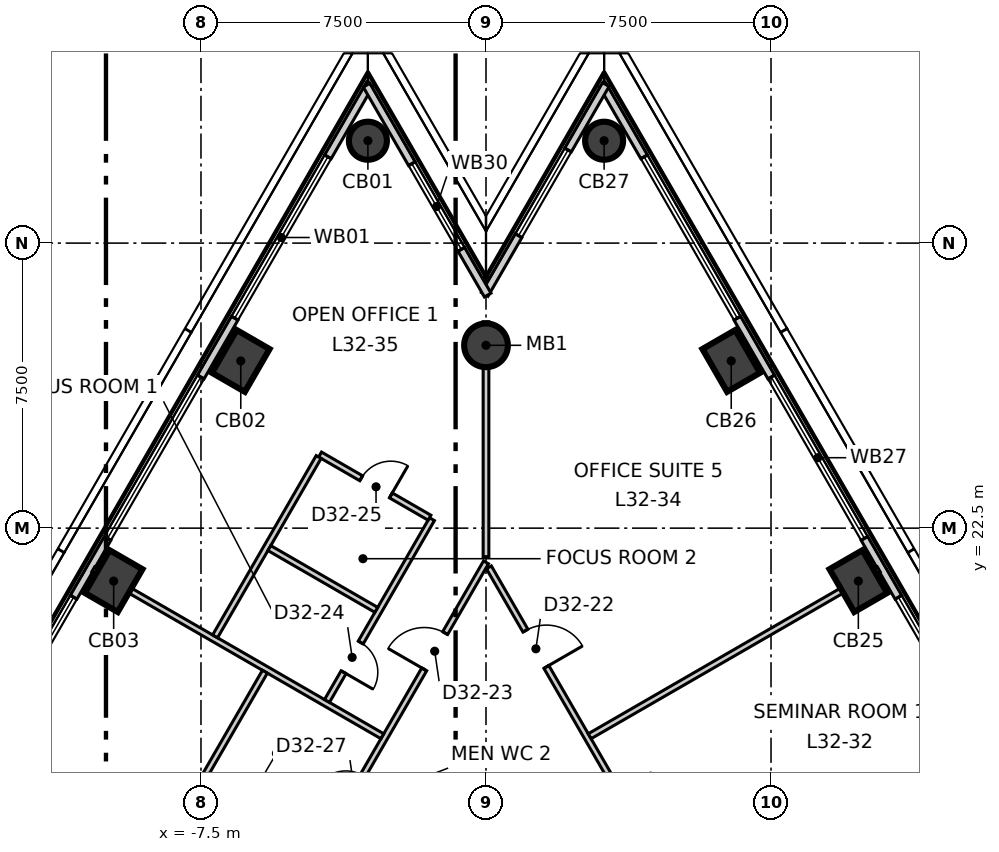
"""IFC4 building model, lengths in metres.
Left out: names, types, materials, properties, quantities, classifications, styles, units other than length and angle.
Written with IfcOpenShell. Run it as: python <this file> out.ifc"""

import sys

from ifc_helpers import new_model, si_unit, direction, frame, frame_2d, origin, origin_2d, place, context, subcontext, project, spatial, rectangle, circle, extrude, element, fill, save


model = new_model("IFC4")
c1 = context("Model", 3, precision=1e-05, world=origin(), true_north=direction((0.0, 1.0)))
c2 = subcontext(c1, "Body", "Model", "MODEL_VIEW")
j1 = project(units=[si_unit("LENGTHUNIT", "METRE"), si_unit("PLANEANGLEUNIT", "RADIAN")], contexts=[c1])
p1 = place(None, origin())
s1 = spatial("IfcSite", under=j1, at=p1, CompositionType="ELEMENT")
p2 = place(p1, origin())
s2 = spatial("IfcBuilding", under=s1, at=p2, CompositionType="ELEMENT")
p3 = place(p2, frame((0.0, 0.0, 140.3)))
s3 = spatial("IfcBuildingStorey", under=s2, at=p3, CompositionType="ELEMENT", Elevation=140.3)
p4 = place(p3, frame((-3.108, 32.694, -0.3), z_axis=(0.0, 0.0, 1.0), x_axis=(0.5, 0.866025403784, 0.0)))
e1 = element("IfcColumn", 1, at=p4, inside=s3, PredefinedType="COLUMN", context=c2, shape_type="SweptSolid", body=[
    extrude(circle(Radius=0.5, at=origin_2d()), origin(), (0.0, 0.0, 1.0), 4.0),
])
for number, where, z_axis, x_axis in (
    (2, (-6.453, 26.9, -0.3), (0.0, 0.0, 1.0), (0.5, 0.866, 0.0)),
    (3, (-9.798, 21.107, -0.3), (0.0, 0.0, 1.0), (0.5, 0.866, 0.0)),
    (4, (9.798, 21.107, -0.3), (0.0, 0.0, 1.0), (-0.5, 0.866, 0.0)),
    (5, (6.453, 26.9, -0.3), (0.0, 0.0, 1.0), (-0.5, 0.866, 0.0)),
):
    element("IfcColumn", number, at=place(p3, frame(where, z_axis=z_axis, x_axis=x_axis)), inside=s3, PredefinedType="COLUMN", context=c2, shape_type="SweptSolid", body=[
        extrude(rectangle(XDim=1.3, YDim=1.0, at=origin_2d()), origin(), (0.0, 0.0, 1.0), 4.0),
    ])
p5 = place(p3, frame((3.108, 32.694, -0.3), z_axis=(0.0, 0.0, 1.0), x_axis=(-0.5, 0.866025403784, 0.0)))
e6 = element("IfcColumn", 6, at=p5, inside=s3, PredefinedType="COLUMN", context=c2, shape_type="SweptSolid", body=[
    extrude(circle(Radius=0.5, at=origin_2d()), origin(), (0.0, 0.0, 1.0), 4.0),
])
p6 = place(p3, frame((0.0, 27.311, -0.3), z_axis=(0.0, 0.0, 1.0), x_axis=(1.0, 0.0, 0.0)))
e7 = element("IfcColumn", 7, at=p6, inside=s3, PredefinedType="COLUMN", context=c2, shape_type="SweptSolid", body=[
    extrude(circle(Radius=0.575, at=origin_2d()), origin(), (0.0, 0.0, 1.0), 4.0),
])
p7 = place(p3, frame((-3.063, 34.172, 0.0), z_axis=(0.0, 0.0, 1.0), x_axis=(-0.500008098571, -0.866020728022, 0.0)))
e8 = element("IfcWall", 8, at=p7, inside=s3, PredefinedType="ELEMENTEDWALL", context=c2, shape_type="SweptSolid", body=[
    extrude(rectangle(XDim=56.105, YDim=0.2, at=frame_2d((28.052, 0.0))), origin(), (0.0, 0.0, 1.0), 3.7),
])
p8 = place(p7, frame((2.197, 0.0, 0.9)))
e9 = element("IfcOpeningElement", 9, at=p8, cuts=e8, PredefinedType="OPENING", context=c2, shape_type="SweptSolid", body=[
    extrude(rectangle(XDim=4.9, YDim=2.5, at=frame_2d((2.45, 1.25))), frame((0.0, 0.11, 0.0), z_axis=(0.0, -1.0, 0.0), x_axis=(1.0, 0.0, 0.0)), (0.0, 0.0, 1.0), 0.22),
])
p9 = place(p7, frame((8.887, 0.0, 0.9)))
e10 = element("IfcOpeningElement", 10, at=p9, cuts=e8, PredefinedType="OPENING", context=c2, shape_type="SweptSolid", body=[
    extrude(rectangle(XDim=4.9, YDim=2.5, at=frame_2d((2.45, 1.25))), frame((0.0, 0.11, 0.0), z_axis=(0.0, -1.0, 0.0), x_axis=(1.0, 0.0, 0.0)), (0.0, 0.0, 1.0), 0.22),
])
p10 = place(p7, frame((15.577, 0.0, 0.9)))
e11 = element("IfcOpeningElement", 11, at=p10, cuts=e8, PredefinedType="OPENING", context=c2, shape_type="SweptSolid", body=[
    extrude(rectangle(XDim=4.9, YDim=2.5, at=frame_2d((2.45, 1.25))), frame((0.0, 0.11, 0.0), z_axis=(0.0, -1.0, 0.0), x_axis=(1.0, 0.0, 0.0)), (0.0, 0.0, 1.0), 0.22),
])
p11 = place(p7, frame((22.267, 0.0, 0.9)))
e12 = element("IfcOpeningElement", 12, at=p11, cuts=e8, PredefinedType="OPENING", context=c2, shape_type="SweptSolid", body=[
    extrude(rectangle(XDim=4.9, YDim=2.5, at=frame_2d((2.45, 1.25))), frame((0.0, 0.11, 0.0), z_axis=(0.0, -1.0, 0.0), x_axis=(1.0, 0.0, 0.0)), (0.0, 0.0, 1.0), 0.22),
])
p12 = place(p7, frame((28.957, 0.0, 0.9)))
e13 = element("IfcOpeningElement", 13, at=p12, cuts=e8, PredefinedType="OPENING", context=c2, shape_type="SweptSolid", body=[
    extrude(rectangle(XDim=4.9, YDim=2.5, at=frame_2d((2.45, 1.25))), frame((0.0, 0.11, 0.0), z_axis=(0.0, -1.0, 0.0), x_axis=(1.0, 0.0, 0.0)), (0.0, 0.0, 1.0), 0.22),
])
p13 = place(p7, frame((35.647, 0.0, 0.9)))
e14 = element("IfcOpeningElement", 14, at=p13, cuts=e8, PredefinedType="OPENING", context=c2, shape_type="SweptSolid", body=[
    extrude(rectangle(XDim=4.9, YDim=2.5, at=frame_2d((2.45, 1.25))), frame((0.0, 0.11, 0.0), z_axis=(0.0, -1.0, 0.0), x_axis=(1.0, 0.0, 0.0)), (0.0, 0.0, 1.0), 0.22),
])
p14 = place(p7, frame((42.337, 0.0, 0.9)))
e15 = element("IfcOpeningElement", 15, at=p14, cuts=e8, PredefinedType="OPENING", context=c2, shape_type="SweptSolid", body=[
    extrude(rectangle(XDim=4.9, YDim=2.5, at=frame_2d((2.45, 1.25))), frame((0.0, 0.11, 0.0), z_axis=(0.0, -1.0, 0.0), x_axis=(1.0, 0.0, 0.0)), (0.0, 0.0, 1.0), 0.22),
])
p15 = place(p7, frame((49.027, 0.0, 0.9)))
e16 = element("IfcOpeningElement", 16, at=p15, cuts=e8, PredefinedType="OPENING", context=c2, shape_type="SweptSolid", body=[
    extrude(rectangle(XDim=4.9, YDim=2.5, at=frame_2d((2.45, 1.25))), frame((0.0, 0.11, 0.0), z_axis=(0.0, -1.0, 0.0), x_axis=(1.0, 0.0, 0.0)), (0.0, 0.0, 1.0), 0.22),
])
p16 = place(p3, frame((31.126, -14.433, 0.0), z_axis=(0.0, 0.0, 1.0), x_axis=(-0.500008098571, 0.866020728022, 0.0)))
e17 = element("IfcWall", 17, at=p16, inside=s3, PredefinedType="ELEMENTEDWALL", context=c2, shape_type="SweptSolid", body=[
    extrude(rectangle(XDim=56.105, YDim=0.2, at=frame_2d((28.052, 0.0))), origin(), (0.0, 0.0, 1.0), 3.7),
])
p17 = place(p16, frame((2.198, 0.0, 0.9)))
e18 = element("IfcOpeningElement", 18, at=p17, cuts=e17, PredefinedType="OPENING", context=c2, shape_type="SweptSolid", body=[
    extrude(rectangle(XDim=4.9, YDim=2.5, at=frame_2d((2.45, 1.25))), frame((0.0, 0.11, 0.0), z_axis=(0.0, -1.0, 0.0), x_axis=(1.0, 0.0, 0.0)), (0.0, 0.0, 1.0), 0.22),
])
p18 = place(p16, frame((8.888, 0.0, 0.9)))
e19 = element("IfcOpeningElement", 19, at=p18, cuts=e17, PredefinedType="OPENING", context=c2, shape_type="SweptSolid", body=[
    extrude(rectangle(XDim=4.9, YDim=2.5, at=frame_2d((2.45, 1.25))), frame((0.0, 0.11, 0.0), z_axis=(0.0, -1.0, 0.0), x_axis=(1.0, 0.0, 0.0)), (0.0, 0.0, 1.0), 0.22),
])
p19 = place(p16, frame((15.578, 0.0, 0.9)))
e20 = element("IfcOpeningElement", 20, at=p19, cuts=e17, PredefinedType="OPENING", context=c2, shape_type="SweptSolid", body=[
    extrude(rectangle(XDim=4.9, YDim=2.5, at=frame_2d((2.45, 1.25))), frame((0.0, 0.11, 0.0), z_axis=(0.0, -1.0, 0.0), x_axis=(1.0, 0.0, 0.0)), (0.0, 0.0, 1.0), 0.22),
])
p20 = place(p16, frame((22.267, 0.0, 0.9)))
e21 = element("IfcOpeningElement", 21, at=p20, cuts=e17, PredefinedType="OPENING", context=c2, shape_type="SweptSolid", body=[
    extrude(rectangle(XDim=4.9, YDim=2.5, at=frame_2d((2.45, 1.25))), frame((0.0, 0.11, 0.0), z_axis=(0.0, -1.0, 0.0), x_axis=(1.0, 0.0, 0.0)), (0.0, 0.0, 1.0), 0.22),
])
p21 = place(p16, frame((28.957, 0.0, 0.9)))
e22 = element("IfcOpeningElement", 22, at=p21, cuts=e17, PredefinedType="OPENING", context=c2, shape_type="SweptSolid", body=[
    extrude(rectangle(XDim=4.9, YDim=2.5, at=frame_2d((2.45, 1.25))), frame((0.0, 0.11, 0.0), z_axis=(0.0, -1.0, 0.0), x_axis=(1.0, 0.0, 0.0)), (0.0, 0.0, 1.0), 0.22),
])
p22 = place(p16, frame((35.647, 0.0, 0.9)))
e23 = element("IfcOpeningElement", 23, at=p22, cuts=e17, PredefinedType="OPENING", context=c2, shape_type="SweptSolid", body=[
    extrude(rectangle(XDim=4.9, YDim=2.5, at=frame_2d((2.45, 1.25))), frame((0.0, 0.11, 0.0), z_axis=(0.0, -1.0, 0.0), x_axis=(1.0, 0.0, 0.0)), (0.0, 0.0, 1.0), 0.22),
])
p23 = place(p16, frame((42.337, 0.0, 0.9)))
e24 = element("IfcOpeningElement", 24, at=p23, cuts=e17, PredefinedType="OPENING", context=c2, shape_type="SweptSolid", body=[
    extrude(rectangle(XDim=4.9, YDim=2.5, at=frame_2d((2.45, 1.25))), frame((0.0, 0.11, 0.0), z_axis=(0.0, -1.0, 0.0), x_axis=(1.0, 0.0, 0.0)), (0.0, 0.0, 1.0), 0.22),
])
p24 = place(p16, frame((49.027, 0.0, 0.9)))
e25 = element("IfcOpeningElement", 25, at=p24, cuts=e17, PredefinedType="OPENING", context=c2, shape_type="SweptSolid", body=[
    extrude(rectangle(XDim=4.9, YDim=2.5, at=frame_2d((2.45, 1.25))), frame((0.0, 0.11, 0.0), z_axis=(0.0, -1.0, 0.0), x_axis=(1.0, 0.0, 0.0)), (0.0, 0.0, 1.0), 0.22),
])
p25 = place(p3, frame((3.153, 34.172, 0.0), z_axis=(0.0, 0.0, 1.0), x_axis=(-0.499968821344, -0.866043404042, 0.0)))
e26 = element("IfcWall", 26, at=p25, inside=s3, PredefinedType="ELEMENTEDWALL", context=c2, shape_type="SweptSolid", body=[
    extrude(rectangle(XDim=6.376, YDim=0.2, at=frame_2d((3.188, 0.0))), origin(), (0.0, 0.0, 1.0), 3.7),
])
p26 = place(p25, frame((1.99, 0.0, 0.9)))
e27 = element("IfcOpeningElement", 27, at=p26, cuts=e26, PredefinedType="OPENING", context=c2, shape_type="SweptSolid", body=[
    extrude(rectangle(XDim=2.6, YDim=2.5, at=frame_2d((1.3, 1.25))), frame((0.0, 0.11, 0.0), z_axis=(0.0, -1.0, 0.0), x_axis=(1.0, 0.0, 0.0)), (0.0, 0.0, 1.0), 0.22),
])
p27 = place(p3, frame((0.045, 28.633, 0.0), z_axis=(0.0, 0.0, 1.0), x_axis=(-0.49998540044, 0.866033832681, 0.0)))
e28 = element("IfcWall", 28, at=p27, inside=s3, PredefinedType="ELEMENTEDWALL", context=c2, shape_type="SweptSolid", body=[
    extrude(rectangle(XDim=6.376, YDim=0.2, at=frame_2d((3.188, 0.0))), origin(), (0.0, 0.0, 1.0), 3.7),
])
p28 = place(p27, frame((1.39, 0.0, 0.9)))
e29 = element("IfcOpeningElement", 29, at=p28, cuts=e28, PredefinedType="OPENING", context=c2, shape_type="SweptSolid", body=[
    extrude(rectangle(XDim=2.6, YDim=2.5, at=frame_2d((1.3, 1.25))), frame((0.0, 0.11, 0.0), z_axis=(0.0, -1.0, 0.0), x_axis=(1.0, 0.0, 0.0)), (0.0, 0.0, 1.0), 0.22),
])
p29 = place(p3, frame((-8.902, 6.181, 0.0), z_axis=(0.0, 0.0, 1.0), x_axis=(0.499992688384, 0.866029625107, 0.0)))
e30 = element("IfcWall", 30, at=p29, inside=s3, PredefinedType="PARTITIONING", context=c2, shape_type="SweptSolid", body=[
    extrude(rectangle(XDim=17.804, YDim=0.15, at=frame_2d((8.902, 0.0))), origin(), (0.0, 0.0, 1.0), 3.7),
])
p30 = place(p29, frame((14.554, 0.0, 0.0)))
e31 = element("IfcOpeningElement", 31, at=p30, cuts=e30, PredefinedType="OPENING", context=c2, shape_type="SweptSolid", body=[
    extrude(rectangle(XDim=1.1, YDim=2.1, at=frame_2d((0.55, 1.05))), frame((0.0, 0.085, 0.0), z_axis=(0.0, -1.0, 0.0), x_axis=(1.0, 0.0, 0.0)), (0.0, 0.0, 1.0), 0.17),
])
p31 = place(p29, frame((10.428, 0.0, 0.0)))
e32 = element("IfcOpeningElement", 32, at=p31, cuts=e30, PredefinedType="OPENING", context=c2, shape_type="SweptSolid", body=[
    extrude(rectangle(XDim=0.9, YDim=2.1, at=frame_2d((0.45, 1.05))), frame((0.0, 0.085, 0.0), z_axis=(0.0, -1.0, 0.0), x_axis=(1.0, 0.0, 0.0)), (0.0, 0.0, 1.0), 0.17),
])
p32 = place(p29, frame((7.228, 0.0, 0.0)))
e33 = element("IfcOpeningElement", 33, at=p32, cuts=e30, PredefinedType="OPENING", context=c2, shape_type="SweptSolid", body=[
    extrude(rectangle(XDim=0.9, YDim=2.1, at=frame_2d((0.45, 1.05))), frame((0.0, 0.085, 0.0), z_axis=(0.0, -1.0, 0.0), x_axis=(1.0, 0.0, 0.0)), (0.0, 0.0, 1.0), 0.17),
])
p33 = place(p29, frame((4.428, 0.0, 0.0)))
e34 = element("IfcOpeningElement", 34, at=p33, cuts=e30, PredefinedType="OPENING", context=c2, shape_type="SweptSolid", body=[
    extrude(rectangle(XDim=1.0, YDim=2.1, at=frame_2d((0.5, 1.05))), frame((0.0, 0.085, 0.0), z_axis=(0.0, -1.0, 0.0), x_axis=(1.0, 0.0, 0.0)), (0.0, 0.0, 1.0), 0.17),
])
p34 = place(p3, frame((-10.335, 21.417, 0.0), z_axis=(0.0, 0.0, 1.0), x_axis=(0.866014327354, -0.50001918445, 0.0)))
e35 = element("IfcWall", 35, at=p34, inside=s3, PredefinedType="PARTITIONING", context=c2, shape_type="SweptSolid", body=[
    extrude(rectangle(XDim=8.784, YDim=0.15, at=frame_2d((4.392, 0.0))), origin(), (0.0, 0.0, 1.0), 3.7),
])
p35 = place(p3, frame((-10.181, 11.167, 0.0), z_axis=(0.0, 0.0, 1.0), x_axis=(0.500033294772, 0.866006180185, 0.0)))
e36 = element("IfcWall", 36, at=p35, inside=s3, PredefinedType="PARTITIONING", context=c2, shape_type="SweptSolid", body=[
    extrude(rectangle(XDim=8.725, YDim=0.15, at=frame_2d((4.363, 0.0))), origin(), (0.0, 0.0, 1.0), 3.7),
])
p36 = place(p3, frame((0.0, 21.75, 0.0), z_axis=(0.0, 0.0, 1.0), x_axis=(0.0, 1.0, 0.0)))
e37 = element("IfcWall", 37, at=p36, inside=s3, PredefinedType="PARTITIONING", context=c2, shape_type="SweptSolid", body=[
    extrude(rectangle(XDim=6.181, YDim=0.15, at=frame_2d((3.09, 0.0))), origin(), (0.0, 0.0, 1.0), 3.15),
])
p37 = place(p3, frame((0.076, 21.468, 0.0), z_axis=(0.0, 0.0, 1.0), x_axis=(0.499999691263, -0.866025582034, 0.0)))
e38 = element("IfcWall", 38, at=p37, inside=s3, PredefinedType="PARTITIONING", context=c2, shape_type="SweptSolid", body=[
    extrude(rectangle(XDim=24.342, YDim=0.15, at=frame_2d((12.171, 0.0))), origin(), (0.0, 0.0, 1.0), 3.7),
])
p38 = place(p37, frame((17.594, 0.0, 0.0)))
e39 = element("IfcOpeningElement", 39, at=p38, cuts=e38, PredefinedType="OPENING", context=c2, shape_type="SweptSolid", body=[
    extrude(rectangle(XDim=1.1, YDim=2.1, at=frame_2d((0.55, 1.05))), frame((0.0, 0.085, 0.0), z_axis=(0.0, -1.0, 0.0), x_axis=(1.0, 0.0, 0.0)), (0.0, 0.0, 1.0), 0.17),
])
p39 = place(p37, frame((6.814, 0.0, 0.0)))
e40 = element("IfcOpeningElement", 40, at=p39, cuts=e38, PredefinedType="OPENING", context=c2, shape_type="SweptSolid", body=[
    extrude(rectangle(XDim=1.0, YDim=2.1, at=frame_2d((0.5, 1.05))), frame((0.0, 0.085, 0.0), z_axis=(0.0, -1.0, 0.0), x_axis=(1.0, 0.0, 0.0)), (0.0, 0.0, 1.0), 0.17),
])
p40 = place(p37, frame((10.214, 0.0, 0.0)))
e41 = element("IfcOpeningElement", 41, at=p40, cuts=e38, PredefinedType="OPENING", context=c2, shape_type="SweptSolid", body=[
    extrude(rectangle(XDim=0.9, YDim=2.1, at=frame_2d((0.45, 1.05))), frame((0.0, 0.085, 0.0), z_axis=(0.0, -1.0, 0.0), x_axis=(1.0, 0.0, 0.0)), (0.0, 0.0, 1.0), 0.17),
])
p41 = place(p37, frame((1.924, 0.0, 0.0)))
e42 = element("IfcOpeningElement", 42, at=p41, cuts=e38, PredefinedType="OPENING", context=c2, shape_type="SweptSolid", body=[
    extrude(rectangle(XDim=1.1, YDim=2.1, at=frame_2d((0.55, 1.05))), frame((0.0, 0.085, 0.0), z_axis=(0.0, -1.0, 0.0), x_axis=(1.0, 0.0, 0.0)), (0.0, 0.0, 1.0), 0.17),
])
p42 = place(p3, frame((2.728, 17.025, 0.0), z_axis=(0.0, 0.0, 1.0), x_axis=(0.866014327354, 0.50001918445, 0.0)))
e43 = element("IfcWall", 43, at=p42, inside=s3, PredefinedType="PARTITIONING", context=c2, shape_type="SweptSolid", body=[
    extrude(rectangle(XDim=8.784, YDim=0.15, at=frame_2d((4.392, 0.0))), origin(), (0.0, 0.0, 1.0), 3.7),
])
p43 = place(p3, frame((-4.184, 17.953, 0.0), z_axis=(0.0, 0.0, 1.0), x_axis=(0.499974945523, 0.866039868511, 0.0)))
e44 = element("IfcWall", 44, at=p43, inside=s3, PredefinedType="PARTITIONING", context=c2, shape_type="SweptSolid", body=[
    extrude(rectangle(XDim=5.524, YDim=0.15, at=frame_2d((2.762, 0.0))), origin(), (0.0, 0.0, 1.0), 3.7),
])
p44 = place(p43, frame((0.874, 0.0, 0.0)))
e45 = element("IfcOpeningElement", 45, at=p44, cuts=e44, PredefinedType="OPENING", context=c2, shape_type="SweptSolid", body=[
    extrude(rectangle(XDim=0.9, YDim=2.1, at=frame_2d((0.45, 1.05))), frame((0.0, 0.085, 0.0), z_axis=(0.0, -1.0, 0.0), x_axis=(1.0, 0.0, 0.0)), (0.0, 0.0, 1.0), 0.17),
])
p45 = place(p3, frame((-4.366, 24.437, 0.0), z_axis=(0.0, 0.0, 1.0), x_axis=(0.866029041019, -0.499993700073, 0.0)))
e46 = element("IfcWall", 46, at=p45, inside=s3, PredefinedType="PARTITIONING", context=c2, shape_type="SweptSolid", body=[
    extrude(rectangle(XDim=3.324, YDim=0.15, at=frame_2d((1.662, 0.0))), origin(), (0.0, 0.0, 1.0), 3.7),
])
p46 = place(p45, frame((1.25, 0.0, 0.0)))
e47 = element("IfcOpeningElement", 47, at=p46, cuts=e46, PredefinedType="OPENING", context=c2, shape_type="SweptSolid", body=[
    extrude(rectangle(XDim=0.9, YDim=2.1, at=frame_2d((0.45, 1.05))), frame((0.0, 0.085, 0.0), z_axis=(0.0, -1.0, 0.0), x_axis=(1.0, 0.0, 0.0)), (0.0, 0.0, 1.0), 0.17),
])
p47 = place(p3, frame((-7.129, 19.653, 0.0), z_axis=(0.0, 0.0, 1.0), x_axis=(0.500046929803, 0.865998307155, 0.0)))
e48 = element("IfcWall", 48, at=p47, inside=s3, PredefinedType="PARTITIONING", context=c2, shape_type="SweptSolid", body=[
    extrude(rectangle(XDim=5.449, YDim=0.15, at=frame_2d((2.725, 0.0))), origin(), (0.0, 0.0, 1.0), 3.7),
])
p48 = place(p3, frame((-5.701, 21.975, 0.0), z_axis=(0.0, 0.0, 1.0), x_axis=(0.865977875238, -0.500082312822, 0.0)))
e49 = element("IfcWall", 49, at=p48, inside=s3, PredefinedType="PARTITIONING", context=c2, shape_type="SweptSolid", body=[
    extrude(rectangle(XDim=3.25, YDim=0.15, at=frame_2d((1.625, 0.0))), origin(), (0.0, 0.0, 1.0), 3.7),
])
p49 = place(p8, origin())
e50 = element("IfcWindow", 50, at=p49, inside=s3, PartitioningType="SINGLE_PANEL", PredefinedType="WINDOW", context=c2, shape_type="SweptSolid", body=[
    extrude(rectangle(XDim=4.9, YDim=2.5, at=frame_2d((2.45, 1.25))), frame((0.0, 0.03, 0.0), z_axis=(0.0, -1.0, 0.0), x_axis=(1.0, 0.0, 0.0)), (0.0, 0.0, 1.0), 0.06),
])
fill(e9, e50)
p50 = place(p9, origin())
e51 = element("IfcWindow", 51, at=p50, inside=s3, PartitioningType="SINGLE_PANEL", PredefinedType="WINDOW", context=c2, shape_type="SweptSolid", body=[
    extrude(rectangle(XDim=4.9, YDim=2.5, at=frame_2d((2.45, 1.25))), frame((0.0, 0.03, 0.0), z_axis=(0.0, -1.0, 0.0), x_axis=(1.0, 0.0, 0.0)), (0.0, 0.0, 1.0), 0.06),
])
fill(e10, e51)
p51 = place(p10, origin())
e52 = element("IfcWindow", 52, at=p51, inside=s3, PartitioningType="SINGLE_PANEL", PredefinedType="WINDOW", context=c2, shape_type="SweptSolid", body=[
    extrude(rectangle(XDim=4.9, YDim=2.5, at=frame_2d((2.45, 1.25))), frame((0.0, 0.03, 0.0), z_axis=(0.0, -1.0, 0.0), x_axis=(1.0, 0.0, 0.0)), (0.0, 0.0, 1.0), 0.06),
])
fill(e11, e52)
p52 = place(p22, origin())
e53 = element("IfcWindow", 53, at=p52, inside=s3, PartitioningType="SINGLE_PANEL", PredefinedType="WINDOW", context=c2, shape_type="SweptSolid", body=[
    extrude(rectangle(XDim=4.9, YDim=2.5, at=frame_2d((2.45, 1.25))), frame((0.0, 0.03, 0.0), z_axis=(0.0, -1.0, 0.0), x_axis=(1.0, 0.0, 0.0)), (0.0, 0.0, 1.0), 0.06),
])
fill(e23, e53)
p53 = place(p23, origin())
e54 = element("IfcWindow", 54, at=p53, inside=s3, PartitioningType="SINGLE_PANEL", PredefinedType="WINDOW", context=c2, shape_type="SweptSolid", body=[
    extrude(rectangle(XDim=4.9, YDim=2.5, at=frame_2d((2.45, 1.25))), frame((0.0, 0.03, 0.0), z_axis=(0.0, -1.0, 0.0), x_axis=(1.0, 0.0, 0.0)), (0.0, 0.0, 1.0), 0.06),
])
fill(e24, e54)
p54 = place(p24, origin())
e55 = element("IfcWindow", 55, at=p54, inside=s3, PartitioningType="SINGLE_PANEL", PredefinedType="WINDOW", context=c2, shape_type="SweptSolid", body=[
    extrude(rectangle(XDim=4.9, YDim=2.5, at=frame_2d((2.45, 1.25))), frame((0.0, 0.03, 0.0), z_axis=(0.0, -1.0, 0.0), x_axis=(1.0, 0.0, 0.0)), (0.0, 0.0, 1.0), 0.06),
])
fill(e25, e55)
p55 = place(p26, origin())
e56 = element("IfcWindow", 56, at=p55, inside=s3, PartitioningType="SINGLE_PANEL", PredefinedType="WINDOW", context=c2, shape_type="SweptSolid", body=[
    extrude(rectangle(XDim=2.6, YDim=2.5, at=frame_2d((1.3, 1.25))), frame((0.0, 0.03, 0.0), z_axis=(0.0, -1.0, 0.0), x_axis=(1.0, 0.0, 0.0)), (0.0, 0.0, 1.0), 0.06),
])
fill(e27, e56)
p56 = place(p28, origin())
e57 = element("IfcWindow", 57, at=p56, inside=s3, PartitioningType="SINGLE_PANEL", PredefinedType="WINDOW", context=c2, shape_type="SweptSolid", body=[
    extrude(rectangle(XDim=2.6, YDim=2.5, at=frame_2d((1.3, 1.25))), frame((0.0, 0.03, 0.0), z_axis=(0.0, -1.0, 0.0), x_axis=(1.0, 0.0, 0.0)), (0.0, 0.0, 1.0), 0.06),
])
fill(e29, e57)
p57 = place(p41, origin())
e58 = element("IfcDoor", 58, at=p57, inside=s3, OperationType="SINGLE_SWING_LEFT", PredefinedType="DOOR", context=c2, shape_type="SweptSolid", body=[
    extrude(rectangle(XDim=1.1, YDim=2.1, at=frame_2d((0.55, 1.05))), frame((0.0, 0.025, 0.0), z_axis=(0.0, -1.0, 0.0), x_axis=(1.0, 0.0, 0.0)), (0.0, 0.0, 1.0), 0.05),
])
fill(e42, e58)
p58 = place(p30, origin())
e59 = element("IfcDoor", 59, at=p58, inside=s3, OperationType="SINGLE_SWING_RIGHT", PredefinedType="DOOR", context=c2, shape_type="SweptSolid", body=[
    extrude(rectangle(XDim=1.1, YDim=2.1, at=frame_2d((0.55, 1.05))), frame((0.0, 0.025, 0.0), z_axis=(0.0, -1.0, 0.0), x_axis=(1.0, 0.0, 0.0)), (0.0, 0.0, 1.0), 0.05),
])
fill(e31, e59)
p59 = place(p44, origin())
e60 = element("IfcDoor", 60, at=p59, inside=s3, OperationType="SINGLE_SWING_LEFT", PredefinedType="DOOR", context=c2, shape_type="SweptSolid", body=[
    extrude(rectangle(XDim=0.9, YDim=2.1, at=frame_2d((0.45, 1.05))), frame((0.0, 0.025, 0.0), z_axis=(0.0, -1.0, 0.0), x_axis=(1.0, 0.0, 0.0)), (0.0, 0.0, 1.0), 0.05),
])
fill(e45, e60)
p60 = place(p46, origin())
e61 = element("IfcDoor", 61, at=p60, inside=s3, OperationType="SINGLE_SWING_LEFT", PredefinedType="DOOR", context=c2, shape_type="SweptSolid", body=[
    extrude(rectangle(XDim=0.9, YDim=2.1, at=frame_2d((0.45, 1.05))), frame((0.0, 0.025, 0.0), z_axis=(0.0, -1.0, 0.0), x_axis=(1.0, 0.0, 0.0)), (0.0, 0.0, 1.0), 0.05),
])
fill(e47, e61)
save(model, sys.argv[1])
